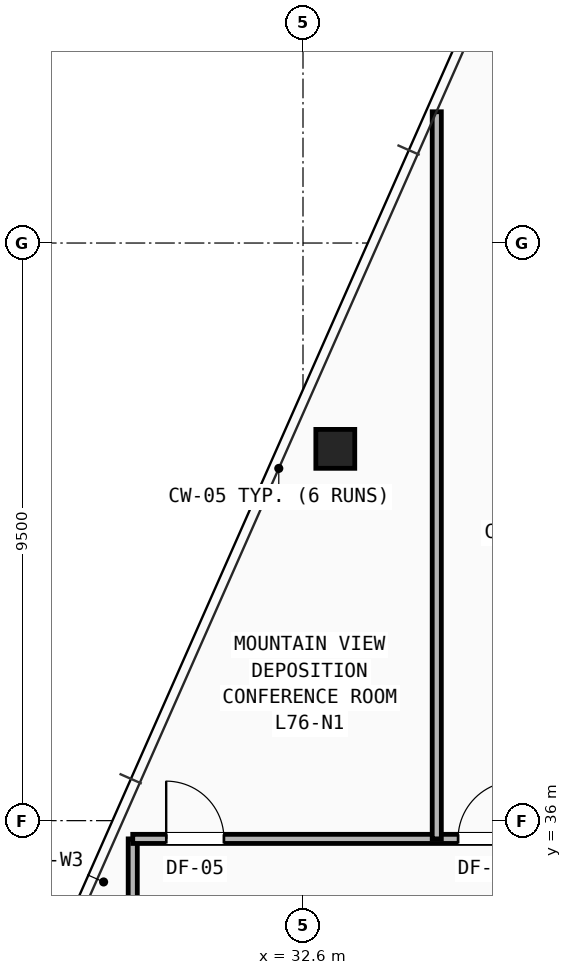
"""IFC4 building model, lengths in metres.
Left out: names, types, materials, properties, quantities, classifications, styles, units other than length and angle.
Written with IfcOpenShell. Run it as: python <this file> out.ifc"""

import sys

from ifc_helpers import new_model, si_unit, direction, frame, frame_2d, origin, origin_2d, place, context, subcontext, project, spatial, rectangle, hollow_rectangle, extrude, element, fill, save


model = new_model("IFC4")
c1 = context("Model", 3, precision=1e-05, world=origin(), true_north=direction((0.0, 1.0)))
c2 = subcontext(c1, "Body", "Model", "MODEL_VIEW")
j1 = project(units=[si_unit("LENGTHUNIT", "METRE"), si_unit("PLANEANGLEUNIT", "RADIAN")], contexts=[c1])
p1 = place(None, origin())
s1 = spatial("IfcSite", under=j1, at=p1, CompositionType="ELEMENT")
p2 = place(p1, origin())
s2 = spatial("IfcBuilding", under=s1, at=p2, CompositionType="ELEMENT")
p3 = place(p2, frame((0.0, 0.0, 269.0)))
s3 = spatial("IfcBuildingStorey", under=s2, at=p3, CompositionType="ELEMENT", Elevation=269.0)
p4 = place(p3, frame((33.131, 42.115, 0.0), z_axis=(0.0, 0.0, 1.0), x_axis=(1.0, 0.0, 0.0)))
e1 = element("IfcColumn", 1, at=p4, inside=s3, PredefinedType="COLUMN", context=c2, shape_type="SweptSolid", body=[
    extrude(hollow_rectangle(XDim=0.64, YDim=0.64, WallThickness=0.045, at=origin_2d()), origin(), (0.0, 0.0, 1.0), 3.5),
])
p5 = place(p3, frame((29.8, 16.4, 0.0), z_axis=(0.0, 0.0, 1.0), x_axis=(0.0, 1.0, 0.0)))
e2 = element("IfcWall", 2, at=p5, inside=s3, PredefinedType="PARTITIONING", context=c2, shape_type="SweptSolid", body=[
    extrude(rectangle(XDim=19.3, YDim=0.15, at=frame_2d((9.65, 0.0))), origin(), (0.0, 0.0, 1.0), 2.292),
])
p6 = place(p5, frame((0.35, 0.0, 0.0)))
e3 = element("IfcOpeningElement", 3, at=p6, cuts=e2, PredefinedType="OPENING", context=c2, shape_type="SweptSolid", body=[
    extrude(rectangle(XDim=0.95, YDim=2.1, at=frame_2d((0.475, 1.05))), frame((0.0, 0.085, 0.0), z_axis=(0.0, -1.0, 0.0), x_axis=(1.0, 0.0, 0.0)), (0.0, 0.0, 1.0), 0.17),
])
p7 = place(p5, frame((7.45, 0.0, 0.0)))
e4 = element("IfcOpeningElement", 4, at=p7, cuts=e2, PredefinedType="OPENING", context=c2, shape_type="SweptSolid", body=[
    extrude(rectangle(XDim=0.95, YDim=2.1, at=frame_2d((0.475, 1.05))), frame((0.0, 0.085, 0.0), z_axis=(0.0, -1.0, 0.0), x_axis=(1.0, 0.0, 0.0)), (0.0, 0.0, 1.0), 0.17),
])
p8 = place(p5, frame((15.25, 0.0, 0.0)))
e5 = element("IfcOpeningElement", 5, at=p8, cuts=e2, PredefinedType="OPENING", context=c2, shape_type="SweptSolid", body=[
    extrude(rectangle(XDim=0.95, YDim=2.1, at=frame_2d((0.475, 1.05))), frame((0.0, 0.085, 0.0), z_axis=(0.0, -1.0, 0.0), x_axis=(1.0, 0.0, 0.0)), (0.0, 0.0, 1.0), 0.17),
])
p9 = place(p3, frame((29.8, 35.7, 0.0), z_axis=(0.0, 0.0, 1.0), x_axis=(1.0, 0.0, 0.0)))
e6 = element("IfcWall", 6, at=p9, inside=s3, PredefinedType="PARTITIONING", context=c2, shape_type="SweptSolid", body=[
    extrude(rectangle(XDim=9.45, YDim=0.15, at=frame_2d((4.725, 0.0))), origin(), (0.0, 0.0, 1.0), 2.628),
])
p10 = place(p9, frame((0.55, 0.0, 0.0)))
e7 = element("IfcOpeningElement", 7, at=p10, cuts=e6, PredefinedType="OPENING", context=c2, shape_type="SweptSolid", body=[
    extrude(rectangle(XDim=0.95, YDim=2.1, at=frame_2d((0.475, 1.05))), frame((0.0, 0.085, 0.0), z_axis=(0.0, -1.0, 0.0), x_axis=(1.0, 0.0, 0.0)), (0.0, 0.0, 1.0), 0.17),
])
p11 = place(p9, frame((5.35, 0.0, 0.0)))
e8 = element("IfcOpeningElement", 8, at=p11, cuts=e6, PredefinedType="OPENING", context=c2, shape_type="SweptSolid", body=[
    extrude(rectangle(XDim=0.95, YDim=2.1, at=frame_2d((0.475, 1.05))), frame((0.0, 0.085, 0.0), z_axis=(0.0, -1.0, 0.0), x_axis=(1.0, 0.0, 0.0)), (0.0, 0.0, 1.0), 0.17),
])
p12 = place(p3, frame((34.8, 35.7, 0.0), z_axis=(0.0, 0.0, 1.0), x_axis=(0.0, 1.0, 0.0)))
e9 = element("IfcWall", 9, at=p12, inside=s3, PredefinedType="PARTITIONING", context=c2, shape_type="SweptSolid", body=[
    extrude(rectangle(XDim=11.959, YDim=0.15, at=frame_2d((5.979, 0.0))), origin(), (0.0, 0.0, 1.0), 2.292),
])
p13 = place(p10, origin())
e10 = element("IfcDoor", 10, at=p13, inside=s3, OperationType="SINGLE_SWING_LEFT", PredefinedType="DOOR", context=c2, shape_type="SweptSolid", body=[
    extrude(rectangle(XDim=0.95, YDim=2.1, at=frame_2d((0.475, 1.05))), frame((0.0, 0.025, 0.0), z_axis=(0.0, -1.0, 0.0), x_axis=(1.0, 0.0, 0.0)), (0.0, 0.0, 1.0), 0.05),
])
fill(e7, e10)
p14 = place(p11, origin())
e11 = element("IfcDoor", 11, at=p14, inside=s3, OperationType="SINGLE_SWING_RIGHT", PredefinedType="DOOR", context=c2, shape_type="SweptSolid", body=[
    extrude(rectangle(XDim=0.95, YDim=2.1, at=frame_2d((0.475, 1.05))), frame((0.0, 0.025, 0.0), z_axis=(0.0, -1.0, 0.0), x_axis=(1.0, 0.0, 0.0)), (0.0, 0.0, 1.0), 0.05),
])
fill(e8, e11)
save(model, sys.argv[1])
